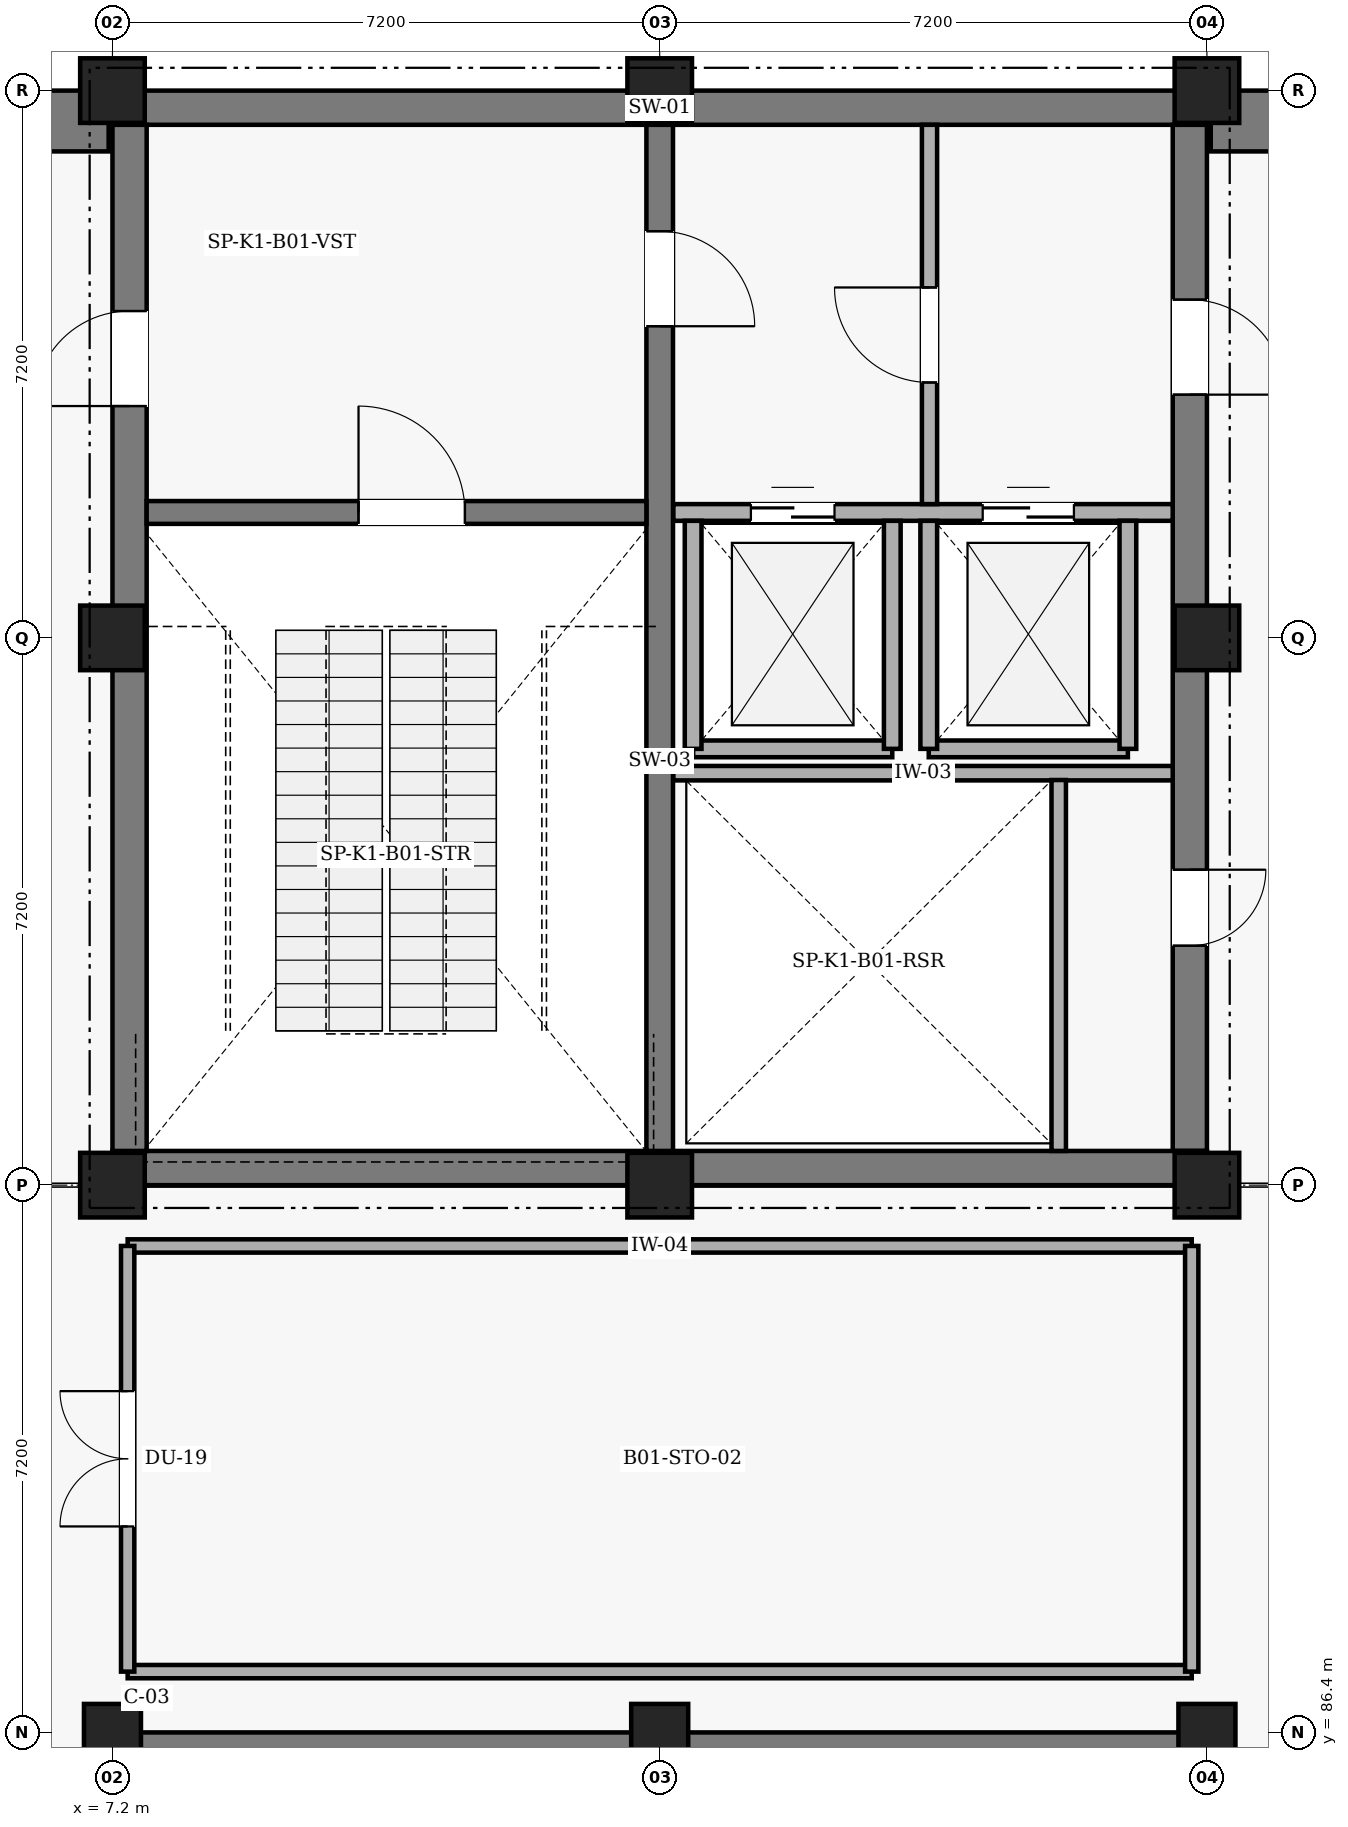
"""IFC4 building model, lengths in metres.
Left out: names, types, materials, properties, quantities, classifications, styles, units other than length and angle.
Written with IfcOpenShell. Run it as: python <this file> out.ifc"""

import sys

from ifc_helpers import new_model, si_unit, direction, frame, frame_2d, origin, origin_2d, place, context, subcontext, project, spatial, rectangle, extrude, element, fill, save


model = new_model("IFC4")
c1 = context("Model", 3, precision=1e-05, world=origin(), true_north=direction((0.0, 1.0)))
c2 = subcontext(c1, "Body", "Model", "MODEL_VIEW")
j1 = project(units=[si_unit("LENGTHUNIT", "METRE"), si_unit("PLANEANGLEUNIT", "RADIAN")], contexts=[c1])
p1 = place(None, origin())
s1 = spatial("IfcSite", under=j1, at=p1, CompositionType="ELEMENT")
p2 = place(p1, origin())
s2 = spatial("IfcBuilding", under=s1, at=p2, CompositionType="ELEMENT")
p3 = place(p2, frame((0.0, 0.0, -5.4)))
s3 = spatial("IfcBuildingStorey", under=s2, at=p3, CompositionType="ELEMENT", Elevation=-5.4)
p4 = place(p3, frame((0.0, 107.6, 0.0), z_axis=(0.0, 0.0, 1.0), x_axis=(1.0, 0.0, 0.0)))
e1 = element("IfcWall", 1, at=p4, inside=s3, PredefinedType="USERDEFINED", context=c2, shape_type="SweptSolid", body=[
    extrude(rectangle(XDim=7.15, YDim=0.8, at=frame_2d((3.575, 0.0))), origin(), (0.0, 0.0, 1.0), 4.95),
])
p5 = place(p3, frame((21.65, 107.6, 0.0), z_axis=(0.0, 0.0, 1.0), x_axis=(1.0, 0.0, 0.0)))
e2 = element("IfcWall", 2, at=p5, inside=s3, PredefinedType="USERDEFINED", context=c2, shape_type="SweptSolid", body=[
    extrude(rectangle(XDim=7.15, YDim=0.8, at=frame_2d((3.575, 0.0))), origin(), (0.0, 0.0, 1.0), 4.95),
])
p6 = place(p3, frame((7.2, 107.775, 0.0), z_axis=(0.0, 0.0, 1.0), x_axis=(1.0, 0.0, 0.0)))
e3 = element("IfcWall", 3, at=p6, inside=s3, PredefinedType="SHEAR", context=c2, shape_type="SweptSolid", body=[
    extrude(rectangle(XDim=14.4, YDim=0.45, at=frame_2d((7.2, 0.0))), origin(), (0.0, 0.0, 1.0), 5.4),
])
p7 = place(p3, frame((21.375, 107.55, 0.0), z_axis=(0.0, 0.0, 1.0), x_axis=(0.0, -1.0, 0.0)))
e4 = element("IfcWall", 4, at=p7, inside=s3, PredefinedType="SHEAR", context=c2, shape_type="SweptSolid", body=[
    extrude(rectangle(XDim=13.5, YDim=0.45, at=frame_2d((6.75, 0.0))), origin(), (0.0, 0.0, 1.0), 5.4),
])
p8 = place(p7, frame((9.8, 0.0, 0.0)))
e5 = element("IfcOpeningElement", 5, at=p8, cuts=e4, PredefinedType="OPENING", context=c2, shape_type="SweptSolid", body=[
    extrude(rectangle(XDim=1.0, YDim=2.15, at=frame_2d((0.5, 1.075))), frame((0.0, 0.235, 0.0), z_axis=(0.0, -1.0, 0.0), x_axis=(1.0, 0.0, 0.0)), (0.0, 0.0, 1.0), 0.47),
])
p9 = place(p7, frame((2.3, 0.0, 0.0)))
e6 = element("IfcOpeningElement", 6, at=p9, cuts=e4, PredefinedType="OPENING", context=c2, shape_type="SweptSolid", body=[
    extrude(rectangle(XDim=1.25, YDim=2.2, at=frame_2d((0.625, 1.1))), frame((0.0, 0.235, 0.0), z_axis=(0.0, -1.0, 0.0), x_axis=(1.0, 0.0, 0.0)), (0.0, 0.0, 1.0), 0.47),
])
p10 = place(p3, frame((21.6, 93.825, 0.0), z_axis=(0.0, 0.0, 1.0), x_axis=(-1.0, 0.0, 0.0)))
e7 = element("IfcWall", 7, at=p10, inside=s3, PredefinedType="SHEAR", context=c2, shape_type="SweptSolid", body=[
    extrude(rectangle(XDim=14.4, YDim=0.45, at=frame_2d((7.2, 0.0))), origin(), (0.0, 0.0, 1.0), 5.4),
])
p11 = place(p3, frame((7.425, 94.05, 0.0), z_axis=(0.0, 0.0, 1.0), x_axis=(0.0, 1.0, 0.0)))
e8 = element("IfcWall", 8, at=p11, inside=s3, PredefinedType="SHEAR", context=c2, shape_type="SweptSolid", body=[
    extrude(rectangle(XDim=13.5, YDim=0.45, at=frame_2d((6.75, 0.0))), origin(), (0.0, 0.0, 1.0), 5.4),
])
p12 = place(p11, frame((9.8, 0.0, 0.0)))
e9 = element("IfcOpeningElement", 9, at=p12, cuts=e8, PredefinedType="OPENING", context=c2, shape_type="SweptSolid", body=[
    extrude(rectangle(XDim=1.25, YDim=2.2, at=frame_2d((0.625, 1.1))), frame((0.0, 0.235, 0.0), z_axis=(0.0, -1.0, 0.0), x_axis=(1.0, 0.0, 0.0)), (0.0, 0.0, 1.0), 0.47),
])
p13 = place(p3, frame((14.4, 107.55, 0.0), z_axis=(0.0, 0.0, 1.0), x_axis=(0.0, -1.0, 0.0)))
e10 = element("IfcWall", 10, at=p13, inside=s3, PredefinedType="SHEAR", context=c2, shape_type="SweptSolid", body=[
    extrude(rectangle(XDim=13.5, YDim=0.35, at=frame_2d((6.75, 0.0))), origin(), (0.0, 0.0, 1.0), 5.4),
])
p14 = place(p13, frame((1.4, 0.0, 0.0)))
e11 = element("IfcOpeningElement", 11, at=p14, cuts=e10, PredefinedType="OPENING", context=c2, shape_type="SweptSolid", body=[
    extrude(rectangle(XDim=1.25, YDim=2.2, at=frame_2d((0.625, 1.1))), frame((0.0, 0.185, 0.0), z_axis=(0.0, -1.0, 0.0), x_axis=(1.0, 0.0, 0.0)), (0.0, 0.0, 1.0), 0.37),
])
p15 = place(p3, frame((7.65, 102.45, 0.0), z_axis=(0.0, 0.0, 1.0), x_axis=(1.0, 0.0, 0.0)))
e12 = element("IfcWall", 12, at=p15, inside=s3, PredefinedType="SHEAR", context=c2, shape_type="SweptSolid", body=[
    extrude(rectangle(XDim=6.575, YDim=0.3, at=frame_2d((3.288, 0.0))), origin(), (0.0, 0.0, 1.0), 5.4),
])
p16 = place(p15, frame((2.788, 0.0, 0.0)))
e13 = element("IfcOpeningElement", 13, at=p16, cuts=e12, PredefinedType="OPENING", context=c2, shape_type="SweptSolid", body=[
    extrude(rectangle(XDim=1.4, YDim=2.2, at=frame_2d((0.7, 1.1))), frame((0.0, 0.16, 0.0), z_axis=(0.0, -1.0, 0.0), x_axis=(1.0, 0.0, 0.0)), (0.0, 0.0, 1.0), 0.32),
])
p17 = place(p3, frame((7.2, 86.225, 0.0), z_axis=(0.0, 0.0, 1.0), x_axis=(1.0, 0.0, 0.0)))
e14 = element("IfcWall", 14, at=p17, inside=s3, PredefinedType="SHEAR", context=c2, shape_type="SweptSolid", body=[
    extrude(rectangle(XDim=14.4, YDim=0.35, at=frame_2d((7.2, 0.0))), origin(), (0.0, 0.0, 1.0), 5.4),
])
p18 = place(p3, frame((7.2, 86.4, 0.0), z_axis=(0.0, 0.0, 1.0), x_axis=(1.0, 0.0, 0.0)))
e15 = element("IfcColumn", 15, at=p18, inside=s3, PredefinedType="COLUMN", context=c2, shape_type="SweptSolid", body=[
    extrude(rectangle(XDim=0.75, YDim=0.75, at=origin_2d()), origin(), (0.0, 0.0, 1.0), 5.0),
])
for number, where, z_axis, x_axis in (
    (16, (7.2, 93.6, 0.0), (0.0, 0.0, 1.0), (1.0, 0.0, 0.0)),
    (17, (7.2, 100.8, 0.0), (0.0, 0.0, 1.0), (1.0, 0.0, 0.0)),
    (18, (7.2, 108.0, 0.0), (0.0, 0.0, 1.0), (1.0, 0.0, 0.0)),
):
    element("IfcColumn", number, at=place(p3, frame(where, z_axis=z_axis, x_axis=x_axis)), inside=s3, PredefinedType="COLUMN", context=c2, shape_type="SweptSolid", body=[
        extrude(rectangle(XDim=0.85, YDim=0.85, at=origin_2d()), origin(), (0.0, 0.0, 1.0), 5.0),
    ])
p19 = place(p3, frame((14.4, 86.4, 0.0), z_axis=(0.0, 0.0, 1.0), x_axis=(1.0, 0.0, 0.0)))
e19 = element("IfcColumn", 19, at=p19, inside=s3, PredefinedType="COLUMN", context=c2, shape_type="SweptSolid", body=[
    extrude(rectangle(XDim=0.75, YDim=0.75, at=origin_2d()), origin(), (0.0, 0.0, 1.0), 5.0),
])
for number, where, z_axis, x_axis in (
    (20, (14.4, 93.6, 0.0), (0.0, 0.0, 1.0), (1.0, 0.0, 0.0)),
    (21, (14.4, 108.0, 0.0), (0.0, 0.0, 1.0), (1.0, 0.0, 0.0)),
):
    element("IfcColumn", number, at=place(p3, frame(where, z_axis=z_axis, x_axis=x_axis)), inside=s3, PredefinedType="COLUMN", context=c2, shape_type="SweptSolid", body=[
        extrude(rectangle(XDim=0.85, YDim=0.85, at=origin_2d()), origin(), (0.0, 0.0, 1.0), 5.0),
    ])
p20 = place(p3, frame((21.6, 86.4, 0.0), z_axis=(0.0, 0.0, 1.0), x_axis=(1.0, 0.0, 0.0)))
e22 = element("IfcColumn", 22, at=p20, inside=s3, PredefinedType="COLUMN", context=c2, shape_type="SweptSolid", body=[
    extrude(rectangle(XDim=0.75, YDim=0.75, at=origin_2d()), origin(), (0.0, 0.0, 1.0), 5.0),
])
for number, where, z_axis, x_axis in (
    (23, (21.6, 93.6, 0.0), (0.0, 0.0, 1.0), (1.0, 0.0, 0.0)),
    (24, (21.6, 100.8, 0.0), (0.0, 0.0, 1.0), (1.0, 0.0, 0.0)),
    (25, (21.6, 108.0, 0.0), (0.0, 0.0, 1.0), (1.0, 0.0, 0.0)),
):
    element("IfcColumn", number, at=place(p3, frame(where, z_axis=z_axis, x_axis=x_axis)), inside=s3, PredefinedType="COLUMN", context=c2, shape_type="SweptSolid", body=[
        extrude(rectangle(XDim=0.85, YDim=0.85, at=origin_2d()), origin(), (0.0, 0.0, 1.0), 5.0),
    ])
p21 = place(p3, frame((14.58, 99.02, 0.0), z_axis=(0.0, 0.0, 1.0), x_axis=(1.0, 0.0, 0.0)))
e26 = element("IfcWall", 26, at=p21, inside=s3, PredefinedType="PARTITIONING", context=c2, shape_type="SweptSolid", body=[
    extrude(rectangle(XDim=6.57, YDim=0.19, at=frame_2d((3.285, 0.0))), origin(), (0.0, 0.0, 1.0), 5.05),
])
p22 = place(p3, frame((19.65, 94.05, 0.0), z_axis=(0.0, 0.0, 1.0), x_axis=(0.0, 1.0, 0.0)))
e27 = element("IfcWall", 27, at=p22, inside=s3, PredefinedType="PARTITIONING", context=c2, shape_type="SweptSolid", body=[
    extrude(rectangle(XDim=4.88, YDim=0.19, at=frame_2d((2.44, 0.0))), origin(), (0.0, 0.0, 1.0), 5.05),
])
p23 = place(p3, frame((14.58, 102.45, 0.0), z_axis=(0.0, 0.0, 1.0), x_axis=(1.0, 0.0, 0.0)))
e28 = element("IfcWall", 28, at=p23, inside=s3, PredefinedType="PARTITIONING", context=c2, shape_type="SweptSolid", body=[
    extrude(rectangle(XDim=6.57, YDim=0.22, at=frame_2d((3.285, 0.0))), origin(), (0.0, 0.0, 1.0), 5.05),
])
p24 = place(p23, frame((1.02, 0.0, 0.0)))
e29 = element("IfcOpeningElement", 29, at=p24, cuts=e28, PredefinedType="OPENING", context=c2, shape_type="SweptSolid", body=[
    extrude(rectangle(XDim=1.1, YDim=2.15, at=frame_2d((0.55, 1.075))), frame((0.0, 0.12, 0.0), z_axis=(0.0, -1.0, 0.0), x_axis=(1.0, 0.0, 0.0)), (0.0, 0.0, 1.0), 0.24),
])
p25 = place(p23, frame((4.07, 0.0, 0.0)))
e30 = element("IfcOpeningElement", 30, at=p25, cuts=e28, PredefinedType="OPENING", context=c2, shape_type="SweptSolid", body=[
    extrude(rectangle(XDim=1.2, YDim=2.15, at=frame_2d((0.6, 1.075))), frame((0.0, 0.12, 0.0), z_axis=(0.0, -1.0, 0.0), x_axis=(1.0, 0.0, 0.0)), (0.0, 0.0, 1.0), 0.24),
])
p26 = place(p3, frame((14.84, 99.34, 0.0), z_axis=(0.0, 0.0, 1.0), x_axis=(1.0, 0.0, 0.0)))
e31 = element("IfcWall", 31, at=p26, inside=s3, PredefinedType="PARTITIONING", context=c2, shape_type="SweptSolid", body=[
    extrude(rectangle(XDim=2.62, YDim=0.22, at=frame_2d((1.31, 0.0))), origin(), (0.0, 0.0, 1.0), 5.05),
])
for number, where, z_axis, x_axis in (
    (32, (14.84, 99.34, 0.0), (0.0, 0.0, 1.0), (0.0, 1.0, 0.0)),
    (33, (17.46, 99.34, 0.0), (0.0, 0.0, 1.0), (0.0, 1.0, 0.0)),
):
    element("IfcWall", number, at=place(p3, frame(where, z_axis=z_axis, x_axis=x_axis)), inside=s3, PredefinedType="PARTITIONING", context=c2, shape_type="SweptSolid", body=[
        extrude(rectangle(XDim=3.0, YDim=0.22, at=frame_2d((1.5, 0.0))), origin(), (0.0, 0.0, 1.0), 5.05),
    ])
p27 = place(p3, frame((17.94, 99.34, 0.0), z_axis=(0.0, 0.0, 1.0), x_axis=(1.0, 0.0, 0.0)))
e34 = element("IfcWall", 34, at=p27, inside=s3, PredefinedType="PARTITIONING", context=c2, shape_type="SweptSolid", body=[
    extrude(rectangle(XDim=2.62, YDim=0.22, at=frame_2d((1.31, 0.0))), origin(), (0.0, 0.0, 1.0), 5.05),
])
for number, where, z_axis, x_axis in (
    (35, (17.94, 99.34, 0.0), (0.0, 0.0, 1.0), (0.0, 1.0, 0.0)),
    (36, (20.56, 99.34, 0.0), (0.0, 0.0, 1.0), (0.0, 1.0, 0.0)),
):
    element("IfcWall", number, at=place(p3, frame(where, z_axis=z_axis, x_axis=x_axis)), inside=s3, PredefinedType="PARTITIONING", context=c2, shape_type="SweptSolid", body=[
        extrude(rectangle(XDim=3.0, YDim=0.22, at=frame_2d((1.5, 0.0))), origin(), (0.0, 0.0, 1.0), 5.05),
    ])
p28 = place(p3, frame((17.95, 102.56, 0.0), z_axis=(0.0, 0.0, 1.0), x_axis=(0.0, 1.0, 0.0)))
e37 = element("IfcWall", 37, at=p28, inside=s3, PredefinedType="PARTITIONING", context=c2, shape_type="SweptSolid", body=[
    extrude(rectangle(XDim=4.99, YDim=0.2, at=frame_2d((2.495, 0.0))), origin(), (0.0, 0.0, 1.0), 5.05),
])
p29 = place(p28, frame((1.6, 0.0, 0.0)))
e38 = element("IfcOpeningElement", 38, at=p29, cuts=e37, PredefinedType="OPENING", context=c2, shape_type="SweptSolid", body=[
    extrude(rectangle(XDim=1.25, YDim=2.2, at=frame_2d((0.625, 1.1))), frame((0.0, 0.11, 0.0), z_axis=(0.0, -1.0, 0.0), x_axis=(1.0, 0.0, 0.0)), (0.0, 0.0, 1.0), 0.22),
])
for number, where, z_axis, x_axis in (
    (39, (7.4, 92.8, 0.0), (0.0, 0.0, 1.0), (1.0, 0.0, 0.0)),
    (40, (21.4, 87.2, 0.0), (0.0, 0.0, 1.0), (-1.0, 0.0, 0.0)),
):
    element("IfcWall", number, at=place(p3, frame(where, z_axis=z_axis, x_axis=x_axis)), inside=s3, PredefinedType="PARTITIONING", context=c2, shape_type="SweptSolid", body=[
        extrude(rectangle(XDim=14.0, YDim=0.175, at=frame_2d((7.0, 0.0))), origin(), (0.0, 0.0, 1.0), 4.2),
    ])
p30 = place(p3, frame((21.4, 92.8, 0.0), z_axis=(0.0, 0.0, 1.0), x_axis=(0.0, -1.0, 0.0)))
e41 = element("IfcWall", 41, at=p30, inside=s3, PredefinedType="PARTITIONING", context=c2, shape_type="SweptSolid", body=[
    extrude(rectangle(XDim=5.6, YDim=0.175, at=frame_2d((2.8, 0.0))), origin(), (0.0, 0.0, 1.0), 4.2),
])
p31 = place(p3, frame((7.4, 87.2, 0.0), z_axis=(0.0, 0.0, 1.0), x_axis=(0.0, 1.0, 0.0)))
e42 = element("IfcWall", 42, at=p31, inside=s3, PredefinedType="PARTITIONING", context=c2, shape_type="SweptSolid", body=[
    extrude(rectangle(XDim=5.6, YDim=0.175, at=frame_2d((2.8, 0.0))), origin(), (0.0, 0.0, 1.0), 4.2),
])
p32 = place(p31, frame((1.91, 0.0, 0.0)))
e43 = element("IfcOpeningElement", 43, at=p32, cuts=e42, PredefinedType="OPENING", context=c2, shape_type="SweptSolid", body=[
    extrude(rectangle(XDim=1.78, YDim=2.28, at=frame_2d((0.89, 1.14))), frame((0.0, 0.097, 0.0), z_axis=(0.0, -1.0, 0.0), x_axis=(1.0, 0.0, 0.0)), (0.0, 0.0, 1.0), 0.195),
])
p33 = place(p16, origin())
e44 = element("IfcDoor", 44, at=p33, inside=s3, OperationType="SINGLE_SWING_LEFT", PredefinedType="DOOR", context=c2, shape_type="SweptSolid", body=[
    extrude(rectangle(XDim=1.4, YDim=2.2, at=frame_2d((0.7, 1.1))), frame((0.0, 0.025, 0.0), z_axis=(0.0, -1.0, 0.0), x_axis=(1.0, 0.0, 0.0)), (0.0, 0.0, 1.0), 0.05),
])
fill(e13, e44)
p34 = place(p14, origin())
e45 = element("IfcDoor", 45, at=p34, inside=s3, OperationType="SINGLE_SWING_RIGHT", PredefinedType="DOOR", context=c2, shape_type="SweptSolid", body=[
    extrude(rectangle(XDim=1.25, YDim=2.2, at=frame_2d((0.625, 1.1))), frame((0.0, 0.025, 0.0), z_axis=(0.0, -1.0, 0.0), x_axis=(1.0, 0.0, 0.0)), (0.0, 0.0, 1.0), 0.05),
])
fill(e11, e45)
p35 = place(p8, origin())
e46 = element("IfcDoor", 46, at=p35, inside=s3, OperationType="SINGLE_SWING_LEFT", PredefinedType="DOOR", context=c2, shape_type="SweptSolid", body=[
    extrude(rectangle(XDim=1.0, YDim=2.15, at=frame_2d((0.5, 1.075))), frame((0.0, 0.025, 0.0), z_axis=(0.0, -1.0, 0.0), x_axis=(1.0, 0.0, 0.0)), (0.0, 0.0, 1.0), 0.05),
])
fill(e5, e46)
p36 = place(p24, origin())
e47 = element("IfcDoor", 47, at=p36, inside=s3, OperationType="DOUBLE_DOOR_SLIDING", PredefinedType="DOOR", context=c2, shape_type="SweptSolid", body=[
    extrude(rectangle(XDim=1.1, YDim=2.15, at=frame_2d((0.55, 1.075))), frame((0.0, 0.025, 0.0), z_axis=(0.0, -1.0, 0.0), x_axis=(1.0, 0.0, 0.0)), (0.0, 0.0, 1.0), 0.05),
])
fill(e29, e47)
p37 = place(p25, origin())
e48 = element("IfcDoor", 48, at=p37, inside=s3, OperationType="DOUBLE_DOOR_SLIDING", PredefinedType="DOOR", context=c2, shape_type="SweptSolid", body=[
    extrude(rectangle(XDim=1.2, YDim=2.15, at=frame_2d((0.6, 1.075))), frame((0.0, 0.025, 0.0), z_axis=(0.0, -1.0, 0.0), x_axis=(1.0, 0.0, 0.0)), (0.0, 0.0, 1.0), 0.05),
])
fill(e30, e48)
p38 = place(p29, origin())
e49 = element("IfcDoor", 49, at=p38, inside=s3, OperationType="SINGLE_SWING_RIGHT", PredefinedType="DOOR", context=c2, shape_type="SweptSolid", body=[
    extrude(rectangle(XDim=1.25, YDim=2.2, at=frame_2d((0.625, 1.1))), frame((0.0, 0.025, 0.0), z_axis=(0.0, -1.0, 0.0), x_axis=(1.0, 0.0, 0.0)), (0.0, 0.0, 1.0), 0.05),
])
fill(e38, e49)
p39 = place(p12, origin())
e50 = element("IfcDoor", 50, at=p39, inside=s3, OperationType="SINGLE_SWING_LEFT", PredefinedType="DOOR", context=c2, shape_type="SweptSolid", body=[
    extrude(rectangle(XDim=1.25, YDim=2.2, at=frame_2d((0.625, 1.1))), frame((0.0, 0.025, 0.0), z_axis=(0.0, -1.0, 0.0), x_axis=(1.0, 0.0, 0.0)), (0.0, 0.0, 1.0), 0.05),
])
fill(e9, e50)
p40 = place(p9, origin())
e51 = element("IfcDoor", 51, at=p40, inside=s3, OperationType="SINGLE_SWING_RIGHT", PredefinedType="DOOR", context=c2, shape_type="SweptSolid", body=[
    extrude(rectangle(XDim=1.25, YDim=2.2, at=frame_2d((0.625, 1.1))), frame((0.0, 0.025, 0.0), z_axis=(0.0, -1.0, 0.0), x_axis=(1.0, 0.0, 0.0)), (0.0, 0.0, 1.0), 0.05),
])
fill(e6, e51)
p41 = place(p32, origin())
e52 = element("IfcDoor", 52, at=p41, inside=s3, OperationType="DOUBLE_DOOR_SINGLE_SWING", PredefinedType="DOOR", context=c2, shape_type="SweptSolid", body=[
    extrude(rectangle(XDim=1.78, YDim=2.28, at=frame_2d((0.89, 1.14))), frame((0.0, 0.025, 0.0), z_axis=(0.0, -1.0, 0.0), x_axis=(1.0, 0.0, 0.0)), (0.0, 0.0, 1.0), 0.05),
])
fill(e43, e52)
save(model, sys.argv[1])
